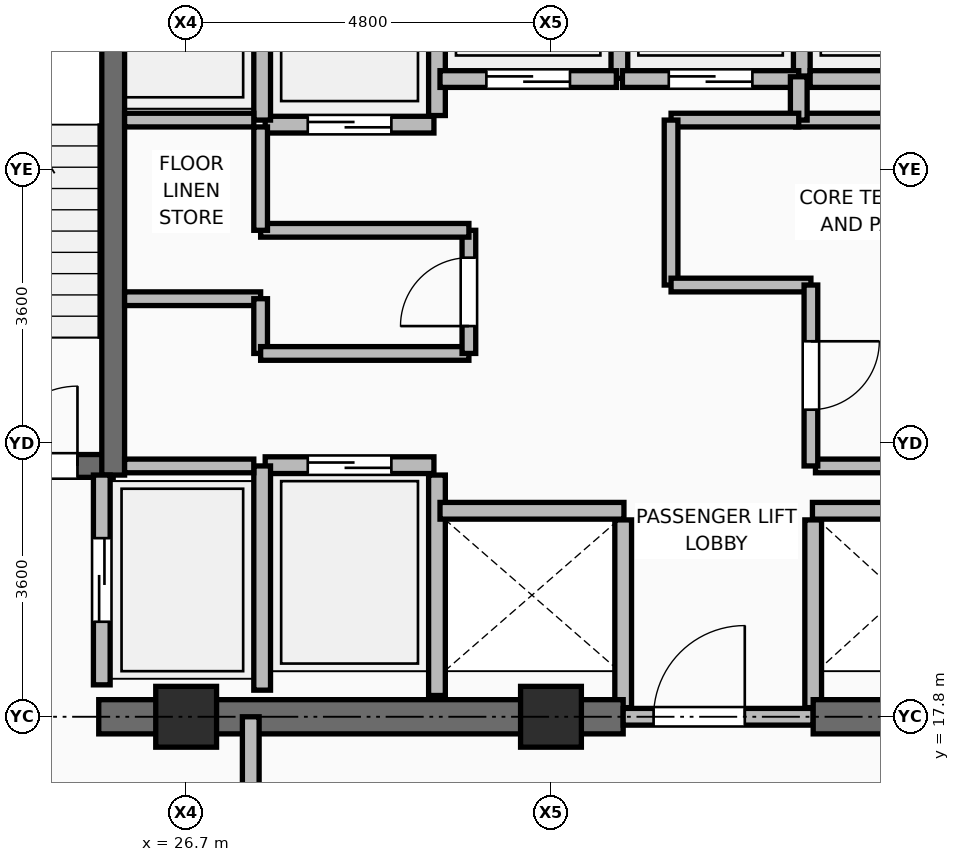
"""IFC4 building model, lengths in metres.
Left out: names, types, materials, properties, quantities, classifications, styles, units other than length and angle.
Written with IfcOpenShell. Run it as: python <this file> out.ifc"""

import sys

from ifc_helpers import new_model, si_unit, direction, frame, frame_2d, origin, origin_2d, place, context, subcontext, project, spatial, rectangle, extrude, element, fill, save


model = new_model("IFC4")
c1 = context("Model", 3, precision=1e-05, world=origin(), true_north=direction((0.0, 1.0)))
c2 = subcontext(c1, "Body", "Model", "MODEL_VIEW")
j1 = project(units=[si_unit("LENGTHUNIT", "METRE"), si_unit("PLANEANGLEUNIT", "RADIAN")], contexts=[c1])
p1 = place(None, origin())
s1 = spatial("IfcSite", under=j1, at=p1, CompositionType="ELEMENT")
p2 = place(p1, origin())
s2 = spatial("IfcBuilding", under=s1, at=p2, CompositionType="ELEMENT")
p3 = place(p2, frame((0.0, 0.0, 242.4)))
s3 = spatial("IfcBuildingStorey", under=s2, at=p3, CompositionType="ELEMENT", Elevation=242.4)
for number, where, z_axis, x_axis in (
    (1, (26.7, 17.8, 0.0), (0.0, 0.0, 1.0), (1.0, 0.0, 0.0)),
    (2, (31.5, 17.8, 0.0), (0.0, 0.0, 1.0), (1.0, 0.0, 0.0)),
):
    element("IfcColumn", number, at=place(p3, frame(where, z_axis=z_axis, x_axis=x_axis)), inside=s3, PredefinedType="COLUMN", context=c2, shape_type="SweptSolid", body=[
        extrude(rectangle(XDim=0.8, YDim=0.8, at=origin_2d()), origin(), (0.0, 0.0, 1.0), 3.75),
    ])
p4 = place(p3, frame((30.0, 18.08, 0.0), z_axis=(0.0, 0.0, 1.0), x_axis=(0.0, 1.0, 0.0)))
e3 = element("IfcWall", 3, at=p4, inside=s3, PredefinedType="PARTITIONING", context=c2, shape_type="SweptSolid", body=[
    extrude(rectangle(XDim=2.9, YDim=0.22, at=frame_2d((1.45, 0.0))), origin(), (0.0, 0.0, 1.0), 3.545),
])
for number, where, z_axis, x_axis in (
    (4, (32.45, 17.92, 0.0), (0.0, 0.0, 1.0), (0.0, 1.0, 0.0)),
    (5, (34.95, 17.92, 0.0), (0.0, 0.0, 1.0), (0.0, 1.0, 0.0)),
):
    element("IfcWall", number, at=place(p3, frame(where, z_axis=z_axis, x_axis=x_axis)), inside=s3, PredefinedType="PARTITIONING", context=c2, shape_type="SweptSolid", body=[
        extrude(rectangle(XDim=2.47, YDim=0.22, at=frame_2d((1.235, 0.0))), origin(), (0.0, 0.0, 1.0), 3.545),
    ])
p5 = place(p3, frame((30.0, 25.71, 0.0), z_axis=(0.0, 0.0, 1.0), x_axis=(0.0, 1.0, 0.0)))
e6 = element("IfcWall", 6, at=p5, inside=s3, PredefinedType="PARTITIONING", context=c2, shape_type="SweptSolid", body=[
    extrude(rectangle(XDim=2.73, YDim=0.22, at=frame_2d((1.365, 0.0))), origin(), (0.0, 0.0, 1.0), 3.545),
])
p6 = place(p3, frame((32.4, 26.2, 0.0), z_axis=(0.0, 0.0, 1.0), x_axis=(0.0, 1.0, 0.0)))
e7 = element("IfcWall", 7, at=p6, inside=s3, PredefinedType="PARTITIONING", context=c2, shape_type="SweptSolid", body=[
    extrude(rectangle(XDim=2.24, YDim=0.22, at=frame_2d((1.12, 0.0))), origin(), (0.0, 0.0, 1.0), 3.545),
])
p7 = place(p3, frame((34.8, 26.23, 0.0), z_axis=(0.0, 0.0, 1.0), x_axis=(0.0, 1.0, 0.0)))
e8 = element("IfcWall", 8, at=p7, inside=s3, PredefinedType="PARTITIONING", context=c2, shape_type="SweptSolid", body=[
    extrude(rectangle(XDim=2.21, YDim=0.22, at=frame_2d((1.105, 0.0))), origin(), (0.0, 0.0, 1.0), 3.545),
])
p8 = place(p3, frame((34.91, 26.19, 0.0), z_axis=(0.0, 0.0, 1.0), x_axis=(1.0, 0.0, 0.0)))
e9 = element("IfcWall", 9, at=p8, inside=s3, PredefinedType="PARTITIONING", context=c2, shape_type="SweptSolid", body=[
    extrude(rectangle(XDim=2.14, YDim=0.22, at=frame_2d((1.07, 0.0))), origin(), (0.0, 0.0, 1.0), 3.545),
])
p9 = place(p3, frame((25.55, 17.8, 0.0), z_axis=(0.0, 0.0, 1.0), x_axis=(1.0, 0.0, 0.0)))
e10 = element("IfcWall", 10, at=p9, inside=s3, PredefinedType="SHEAR", context=c2, shape_type="SweptSolid", body=[
    extrude(rectangle(XDim=6.9, YDim=0.45, at=frame_2d((3.45, 0.0))), origin(), (0.0, 0.0, 1.0), 3.57),
])
p10 = place(p3, frame((32.45, 17.8, 0.0), z_axis=(0.0, 0.0, 1.0), x_axis=(1.0, 0.0, 0.0)))
e11 = element("IfcWall", 11, at=p10, inside=s3, PredefinedType="PARTITIONING", context=c2, shape_type="SweptSolid", body=[
    extrude(rectangle(XDim=2.5, YDim=0.22, at=frame_2d((1.25, 0.0))), origin(), (0.0, 0.0, 1.0), 3.081),
])
p11 = place(p10, frame((0.4, 0.0, 0.0)))
e12 = element("IfcOpeningElement", 12, at=p11, cuts=e11, PredefinedType="OPENING", context=c2, shape_type="SweptSolid", body=[
    extrude(rectangle(XDim=1.2, YDim=2.1, at=frame_2d((0.6, 1.05))), frame((0.0, 0.12, 0.0), z_axis=(0.0, -1.0, 0.0), x_axis=(1.0, 0.0, 0.0)), (0.0, 0.0, 1.0), 0.24),
])
p12 = place(p3, frame((34.95, 17.8, 0.0), z_axis=(0.0, 0.0, 1.0), x_axis=(1.0, 0.0, 0.0)))
e13 = element("IfcWall", 13, at=p12, inside=s3, PredefinedType="SHEAR", context=c2, shape_type="SweptSolid", body=[
    extrude(rectangle(XDim=6.375, YDim=0.45, at=frame_2d((3.188, 0.0))), origin(), (0.0, 0.0, 1.0), 3.57),
])
p13 = place(p3, frame((22.125, 21.1, 0.0), z_axis=(0.0, 0.0, 1.0), x_axis=(1.0, 0.0, 0.0)))
e14 = element("IfcWall", 14, at=p13, inside=s3, PredefinedType="SHEAR", context=c2, shape_type="SweptSolid", body=[
    extrude(rectangle(XDim=3.615, YDim=0.3, at=frame_2d((1.808, 0.0))), origin(), (0.0, 0.0, 1.0), 3.57),
])
p14 = place(p13, frame((2.095, 0.0, 0.0)))
e15 = element("IfcOpeningElement", 15, at=p14, cuts=e14, PredefinedType="OPENING", context=c2, shape_type="SweptSolid", body=[
    extrude(rectangle(XDim=1.05, YDim=2.1, at=frame_2d((0.525, 1.05))), frame((0.0, 0.16, 0.0), z_axis=(0.0, -1.0, 0.0), x_axis=(1.0, 0.0, 0.0)), (0.0, 0.0, 1.0), 0.32),
])
p15 = place(p3, frame((25.74, 20.98, 0.0), z_axis=(0.0, 0.0, 1.0), x_axis=(0.0, 1.0, 0.0)))
e16 = element("IfcWall", 16, at=p15, inside=s3, PredefinedType="SHEAR", context=c2, shape_type="SweptSolid", body=[
    extrude(rectangle(XDim=7.99, YDim=0.3, at=frame_2d((3.995, 0.0))), origin(), (0.0, 0.0, 1.0), 3.57),
])
p16 = place(p3, frame((25.59, 18.22, 0.0), z_axis=(0.0, 0.0, 1.0), x_axis=(0.0, 1.0, 0.0)))
e17 = element("IfcWall", 17, at=p16, inside=s3, PredefinedType="PARTITIONING", context=c2, shape_type="SweptSolid", body=[
    extrude(rectangle(XDim=2.76, YDim=0.22, at=frame_2d((1.38, 0.0))), origin(), (0.0, 0.0, 1.0), 3.55),
])
p17 = place(p16, frame((0.83, 0.0, 0.0)))
e18 = element("IfcOpeningElement", 18, at=p17, cuts=e17, PredefinedType="OPENING", context=c2, shape_type="SweptSolid", body=[
    extrude(rectangle(XDim=1.1, YDim=2.2, at=frame_2d((0.55, 1.1))), frame((0.0, 0.12, 0.0), z_axis=(0.0, -1.0, 0.0), x_axis=(1.0, 0.0, 0.0)), (0.0, 0.0, 1.0), 0.24),
])
p18 = place(p3, frame((27.74, 21.11, 0.0), z_axis=(0.0, 0.0, 1.0), x_axis=(1.0, 0.0, 0.0)))
e19 = element("IfcWall", 19, at=p18, inside=s3, PredefinedType="PARTITIONING", context=c2, shape_type="SweptSolid", body=[
    extrude(rectangle(XDim=2.22, YDim=0.22, at=frame_2d((1.11, 0.0))), origin(), (0.0, 0.0, 1.0), 3.55),
])
p19 = place(p18, frame((0.56, 0.0, 0.0)))
e20 = element("IfcOpeningElement", 20, at=p19, cuts=e19, PredefinedType="OPENING", context=c2, shape_type="SweptSolid", body=[
    extrude(rectangle(XDim=1.1, YDim=2.2, at=frame_2d((0.55, 1.1))), frame((0.0, 0.12, 0.0), z_axis=(0.0, -1.0, 0.0), x_axis=(1.0, 0.0, 0.0)), (0.0, 0.0, 1.0), 0.24),
])
p20 = place(p3, frame((27.74, 25.59, 0.0), z_axis=(0.0, 0.0, 1.0), x_axis=(1.0, 0.0, 0.0)))
e21 = element("IfcWall", 21, at=p20, inside=s3, PredefinedType="PARTITIONING", context=c2, shape_type="SweptSolid", body=[
    extrude(rectangle(XDim=2.22, YDim=0.22, at=frame_2d((1.11, 0.0))), origin(), (0.0, 0.0, 1.0), 3.55),
])
p21 = place(p20, frame((0.56, 0.0, 0.0)))
e22 = element("IfcOpeningElement", 22, at=p21, cuts=e21, PredefinedType="OPENING", context=c2, shape_type="SweptSolid", body=[
    extrude(rectangle(XDim=1.1, YDim=2.2, at=frame_2d((0.55, 1.1))), frame((0.0, 0.12, 0.0), z_axis=(0.0, -1.0, 0.0), x_axis=(1.0, 0.0, 0.0)), (0.0, 0.0, 1.0), 0.24),
])
p22 = place(p3, frame((30.04, 20.51, 0.0), z_axis=(0.0, 0.0, 1.0), x_axis=(1.0, 0.0, 0.0)))
e23 = element("IfcWall", 23, at=p22, inside=s3, PredefinedType="PARTITIONING", context=c2, shape_type="SweptSolid", body=[
    extrude(rectangle(XDim=2.42, YDim=0.22, at=frame_2d((1.21, 0.0))), origin(), (0.0, 0.0, 1.0), 3.55),
])
p23 = place(p3, frame((34.94, 20.51, 0.0), z_axis=(0.0, 0.0, 1.0), x_axis=(1.0, 0.0, 0.0)))
e24 = element("IfcWall", 24, at=p23, inside=s3, PredefinedType="PARTITIONING", context=c2, shape_type="SweptSolid", body=[
    extrude(rectangle(XDim=2.24, YDim=0.22, at=frame_2d((1.12, 0.0))), origin(), (0.0, 0.0, 1.0), 3.55),
])
p24 = place(p3, frame((30.04, 26.19, 0.0), z_axis=(0.0, 0.0, 1.0), x_axis=(1.0, 0.0, 0.0)))
e25 = element("IfcWall", 25, at=p24, inside=s3, PredefinedType="PARTITIONING", context=c2, shape_type="SweptSolid", body=[
    extrude(rectangle(XDim=2.32, YDim=0.22, at=frame_2d((1.16, 0.0))), origin(), (0.0, 0.0, 1.0), 3.55),
])
p25 = place(p24, frame((0.61, 0.0, 0.0)))
e26 = element("IfcOpeningElement", 26, at=p25, cuts=e25, PredefinedType="OPENING", context=c2, shape_type="SweptSolid", body=[
    extrude(rectangle(XDim=1.1, YDim=2.2, at=frame_2d((0.55, 1.1))), frame((0.0, 0.12, 0.0), z_axis=(0.0, -1.0, 0.0), x_axis=(1.0, 0.0, 0.0)), (0.0, 0.0, 1.0), 0.24),
])
p26 = place(p3, frame((32.44, 26.19, 0.0), z_axis=(0.0, 0.0, 1.0), x_axis=(1.0, 0.0, 0.0)))
e27 = element("IfcWall", 27, at=p26, inside=s3, PredefinedType="PARTITIONING", context=c2, shape_type="SweptSolid", body=[
    extrude(rectangle(XDim=2.32, YDim=0.22, at=frame_2d((1.16, 0.0))), origin(), (0.0, 0.0, 1.0), 3.55),
])
p27 = place(p26, frame((0.61, 0.0, 0.0)))
e28 = element("IfcOpeningElement", 28, at=p27, cuts=e27, PredefinedType="OPENING", context=c2, shape_type="SweptSolid", body=[
    extrude(rectangle(XDim=1.1, YDim=2.2, at=frame_2d((0.55, 1.1))), frame((0.0, 0.12, 0.0), z_axis=(0.0, -1.0, 0.0), x_axis=(1.0, 0.0, 0.0)), (0.0, 0.0, 1.0), 0.24),
])
p28 = place(p3, frame((27.7, 18.15, 0.0), z_axis=(0.0, 0.0, 1.0), x_axis=(0.0, 1.0, 0.0)))
e29 = element("IfcWall", 29, at=p28, inside=s3, PredefinedType="PARTITIONING", context=c2, shape_type="SweptSolid", body=[
    extrude(rectangle(XDim=2.95, YDim=0.22, at=frame_2d((1.475, 0.0))), origin(), (0.0, 0.0, 1.0), 3.55),
])
p29 = place(p3, frame((27.7, 25.65, 0.0), z_axis=(0.0, 0.0, 1.0), x_axis=(0.0, 1.0, 0.0)))
e30 = element("IfcWall", 30, at=p29, inside=s3, PredefinedType="PARTITIONING", context=c2, shape_type="SweptSolid", body=[
    extrude(rectangle(XDim=3.0, YDim=0.22, at=frame_2d((1.5, 0.0))), origin(), (0.0, 0.0, 1.0), 3.55),
])
for number, where, z_axis, x_axis in (
    (31, (25.89, 21.1, 0.0), (0.0, 0.0, 1.0), (1.0, 0.0, 0.0)),
    (32, (25.89, 25.65, 0.0), (0.0, 0.0, 1.0), (1.0, 0.0, 0.0)),
):
    element("IfcWall", number, at=place(p3, frame(where, z_axis=z_axis, x_axis=x_axis)), inside=s3, PredefinedType="PARTITIONING", context=c2, shape_type="SweptSolid", body=[
        extrude(rectangle(XDim=1.7, YDim=0.18, at=frame_2d((0.85, 0.0))), origin(), (0.0, 0.0, 1.0), 3.55),
    ])
p30 = place(p3, frame((25.89, 23.3, 0.0), z_axis=(0.0, 0.0, 1.0), x_axis=(1.0, 0.0, 0.0)))
e33 = element("IfcWall", 33, at=p30, inside=s3, PredefinedType="PARTITIONING", context=c2, shape_type="SweptSolid", body=[
    extrude(rectangle(XDim=1.79, YDim=0.18, at=frame_2d((0.895, 0.0))), origin(), (0.0, 0.0, 1.0), 3.55),
])
p31 = place(p3, frame((27.68, 22.58, 0.0), z_axis=(0.0, 0.0, 1.0), x_axis=(0.0, 1.0, 0.0)))
e34 = element("IfcWall", 34, at=p31, inside=s3, PredefinedType="PARTITIONING", context=c2, shape_type="SweptSolid", body=[
    extrude(rectangle(XDim=0.72, YDim=0.18, at=frame_2d((0.36, 0.0))), origin(), (0.0, 0.0, 1.0), 3.55),
])
p32 = place(p3, frame((27.68, 22.58, 0.0), z_axis=(0.0, 0.0, 1.0), x_axis=(1.0, 0.0, 0.0)))
e35 = element("IfcWall", 35, at=p32, inside=s3, PredefinedType="PARTITIONING", context=c2, shape_type="SweptSolid", body=[
    extrude(rectangle(XDim=2.74, YDim=0.18, at=frame_2d((1.37, 0.0))), origin(), (0.0, 0.0, 1.0), 3.55),
])
p33 = place(p3, frame((30.42, 22.58, 0.0), z_axis=(0.0, 0.0, 1.0), x_axis=(0.0, 1.0, 0.0)))
e36 = element("IfcWall", 36, at=p33, inside=s3, PredefinedType="PARTITIONING", context=c2, shape_type="SweptSolid", body=[
    extrude(rectangle(XDim=1.62, YDim=0.18, at=frame_2d((0.81, 0.0))), origin(), (0.0, 0.0, 1.0), 3.55),
])
p34 = place(p33, frame((0.36, 0.0, 0.0)))
e37 = element("IfcOpeningElement", 37, at=p34, cuts=e36, PredefinedType="OPENING", context=c2, shape_type="SweptSolid", body=[
    extrude(rectangle(XDim=0.9, YDim=2.1, at=frame_2d((0.45, 1.05))), frame((0.0, 0.1, 0.0), z_axis=(0.0, -1.0, 0.0), x_axis=(1.0, 0.0, 0.0)), (0.0, 0.0, 1.0), 0.2),
])
p35 = place(p3, frame((27.68, 24.2, 0.0), z_axis=(0.0, 0.0, 1.0), x_axis=(1.0, 0.0, 0.0)))
e38 = element("IfcWall", 38, at=p35, inside=s3, PredefinedType="PARTITIONING", context=c2, shape_type="SweptSolid", body=[
    extrude(rectangle(XDim=2.74, YDim=0.18, at=frame_2d((1.37, 0.0))), origin(), (0.0, 0.0, 1.0), 3.55),
])
p36 = place(p3, frame((27.68, 24.2, 0.0), z_axis=(0.0, 0.0, 1.0), x_axis=(0.0, 1.0, 0.0)))
e39 = element("IfcWall", 39, at=p36, inside=s3, PredefinedType="PARTITIONING", context=c2, shape_type="SweptSolid", body=[
    extrude(rectangle(XDim=1.36, YDim=0.18, at=frame_2d((0.68, 0.0))), origin(), (0.0, 0.0, 1.0), 3.55),
])
p37 = place(p3, frame((34.98, 21.1, 0.0), z_axis=(0.0, 0.0, 1.0), x_axis=(1.0, 0.0, 0.0)))
e40 = element("IfcWall", 40, at=p37, inside=s3, PredefinedType="PARTITIONING", context=c2, shape_type="SweptSolid", body=[
    extrude(rectangle(XDim=2.08, YDim=0.18, at=frame_2d((1.04, 0.0))), origin(), (0.0, 0.0, 1.0), 3.55),
])
p38 = place(p3, frame((34.72, 25.65, 0.0), z_axis=(0.0, 0.0, 1.0), x_axis=(1.0, 0.0, 0.0)))
e41 = element("IfcWall", 41, at=p38, inside=s3, PredefinedType="PARTITIONING", context=c2, shape_type="SweptSolid", body=[
    extrude(rectangle(XDim=2.34, YDim=0.18, at=frame_2d((1.17, 0.0))), origin(), (0.0, 0.0, 1.0), 3.55),
])
p39 = place(p3, frame((34.76, 25.65, 0.0), z_axis=(0.0, 0.0, 1.0), x_axis=(0.0, 1.0, 0.0)))
e42 = element("IfcWall", 42, at=p39, inside=s3, PredefinedType="PARTITIONING", context=c2, shape_type="SweptSolid", body=[
    extrude(rectangle(XDim=0.57, YDim=0.22, at=frame_2d((0.285, 0.0))), origin(), (0.0, 0.0, 1.0), 3.55),
])
p40 = place(p3, frame((33.08, 25.65, 0.0), z_axis=(0.0, 0.0, 1.0), x_axis=(1.0, 0.0, 0.0)))
e43 = element("IfcWall", 43, at=p40, inside=s3, PredefinedType="PARTITIONING", context=c2, shape_type="SweptSolid", body=[
    extrude(rectangle(XDim=1.68, YDim=0.18, at=frame_2d((0.84, 0.0))), origin(), (0.0, 0.0, 1.0), 3.55),
])
p41 = place(p3, frame((33.08, 23.48, 0.0), z_axis=(0.0, 0.0, 1.0), x_axis=(0.0, 1.0, 0.0)))
e44 = element("IfcWall", 44, at=p41, inside=s3, PredefinedType="PARTITIONING", context=c2, shape_type="SweptSolid", body=[
    extrude(rectangle(XDim=2.17, YDim=0.18, at=frame_2d((1.085, 0.0))), origin(), (0.0, 0.0, 1.0), 3.55),
])
p42 = place(p3, frame((33.08, 23.48, 0.0), z_axis=(0.0, 0.0, 1.0), x_axis=(1.0, 0.0, 0.0)))
e45 = element("IfcWall", 45, at=p42, inside=s3, PredefinedType="PARTITIONING", context=c2, shape_type="SweptSolid", body=[
    extrude(rectangle(XDim=1.84, YDim=0.18, at=frame_2d((0.92, 0.0))), origin(), (0.0, 0.0, 1.0), 3.55),
])
p43 = place(p3, frame((34.92, 21.1, 0.0), z_axis=(0.0, 0.0, 1.0), x_axis=(0.0, 1.0, 0.0)))
e46 = element("IfcWall", 46, at=p43, inside=s3, PredefinedType="PARTITIONING", context=c2, shape_type="SweptSolid", body=[
    extrude(rectangle(XDim=2.38, YDim=0.18, at=frame_2d((1.19, 0.0))), origin(), (0.0, 0.0, 1.0), 3.55),
])
p44 = place(p43, frame((0.74, 0.0, 0.0)))
e47 = element("IfcOpeningElement", 47, at=p44, cuts=e46, PredefinedType="OPENING", context=c2, shape_type="SweptSolid", body=[
    extrude(rectangle(XDim=0.9, YDim=2.1, at=frame_2d((0.45, 1.05))), frame((0.0, 0.1, 0.0), z_axis=(0.0, -1.0, 0.0), x_axis=(1.0, 0.0, 0.0)), (0.0, 0.0, 1.0), 0.2),
])
p45 = place(p3, frame((27.55, 14.35, 0.0), z_axis=(0.0, 0.0, 1.0), x_axis=(0.0, 1.0, 0.0)))
e48 = element("IfcWall", 48, at=p45, inside=s3, PredefinedType="PARTITIONING", context=c2, shape_type="SweptSolid", body=[
    extrude(rectangle(XDim=3.45, YDim=0.22, at=frame_2d((1.725, 0.0))), origin(), (0.0, 0.0, 1.0), 3.081),
])
p46 = place(p45, frame((1.175, 0.0, 0.0)))
e49 = element("IfcOpeningElement", 49, at=p46, cuts=e48, PredefinedType="OPENING", context=c2, shape_type="SweptSolid", body=[
    extrude(rectangle(XDim=1.1, YDim=2.1, at=frame_2d((0.55, 1.05))), frame((0.0, 0.12, 0.0), z_axis=(0.0, -1.0, 0.0), x_axis=(1.0, 0.0, 0.0)), (0.0, 0.0, 1.0), 0.24),
])
p47 = place(p11, origin())
e50 = element("IfcDoor", 50, at=p47, inside=s3, OperationType="SINGLE_SWING_RIGHT", PredefinedType="DOOR", context=c2, shape_type="SweptSolid", body=[
    extrude(rectangle(XDim=1.2, YDim=2.1, at=frame_2d((0.6, 1.05))), frame((0.0, 0.025, 0.0), z_axis=(0.0, -1.0, 0.0), x_axis=(1.0, 0.0, 0.0)), (0.0, 0.0, 1.0), 0.05),
])
fill(e12, e50)
p48 = place(p14, origin())
e51 = element("IfcDoor", 51, at=p48, inside=s3, OperationType="SINGLE_SWING_RIGHT", PredefinedType="DOOR", context=c2, shape_type="SweptSolid", body=[
    extrude(rectangle(XDim=1.05, YDim=2.1, at=frame_2d((0.525, 1.05))), frame((0.0, 0.025, 0.0), z_axis=(0.0, -1.0, 0.0), x_axis=(1.0, 0.0, 0.0)), (0.0, 0.0, 1.0), 0.05),
])
fill(e15, e51)
p49 = place(p17, origin())
e52 = element("IfcDoor", 52, at=p49, inside=s3, OperationType="DOUBLE_DOOR_SLIDING", PredefinedType="DOOR", context=c2, shape_type="SweptSolid", body=[
    extrude(rectangle(XDim=1.1, YDim=2.2, at=frame_2d((0.55, 1.1))), frame((0.0, 0.025, 0.0), z_axis=(0.0, -1.0, 0.0), x_axis=(1.0, 0.0, 0.0)), (0.0, 0.0, 1.0), 0.05),
])
fill(e18, e52)
p50 = place(p19, origin())
e53 = element("IfcDoor", 53, at=p50, inside=s3, OperationType="DOUBLE_DOOR_SLIDING", PredefinedType="DOOR", context=c2, shape_type="SweptSolid", body=[
    extrude(rectangle(XDim=1.1, YDim=2.2, at=frame_2d((0.55, 1.1))), frame((0.0, 0.025, 0.0), z_axis=(0.0, -1.0, 0.0), x_axis=(1.0, 0.0, 0.0)), (0.0, 0.0, 1.0), 0.05),
])
fill(e20, e53)
p51 = place(p21, frame((1.1, 0.0, 0.0), z_axis=(0.0, 0.0, 1.0), x_axis=(-1.0, 0.0, 0.0)))
e54 = element("IfcDoor", 54, at=p51, inside=s3, OperationType="DOUBLE_DOOR_SLIDING", PredefinedType="DOOR", context=c2, shape_type="SweptSolid", body=[
    extrude(rectangle(XDim=1.1, YDim=2.2, at=frame_2d((0.55, 1.1))), frame((0.0, 0.025, 0.0), z_axis=(0.0, -1.0, 0.0), x_axis=(1.0, 0.0, 0.0)), (0.0, 0.0, 1.0), 0.05),
])
fill(e22, e54)
p52 = place(p25, frame((1.1, 0.0, 0.0), z_axis=(0.0, 0.0, 1.0), x_axis=(-1.0, 0.0, 0.0)))
e55 = element("IfcDoor", 55, at=p52, inside=s3, OperationType="DOUBLE_DOOR_SLIDING", PredefinedType="DOOR", context=c2, shape_type="SweptSolid", body=[
    extrude(rectangle(XDim=1.1, YDim=2.2, at=frame_2d((0.55, 1.1))), frame((0.0, 0.025, 0.0), z_axis=(0.0, -1.0, 0.0), x_axis=(1.0, 0.0, 0.0)), (0.0, 0.0, 1.0), 0.05),
])
fill(e26, e55)
p53 = place(p27, frame((1.1, 0.0, 0.0), z_axis=(0.0, 0.0, 1.0), x_axis=(-1.0, 0.0, 0.0)))
e56 = element("IfcDoor", 56, at=p53, inside=s3, OperationType="DOUBLE_DOOR_SLIDING", PredefinedType="DOOR", context=c2, shape_type="SweptSolid", body=[
    extrude(rectangle(XDim=1.1, YDim=2.2, at=frame_2d((0.55, 1.1))), frame((0.0, 0.025, 0.0), z_axis=(0.0, -1.0, 0.0), x_axis=(1.0, 0.0, 0.0)), (0.0, 0.0, 1.0), 0.05),
])
fill(e28, e56)
p54 = place(p34, origin())
e57 = element("IfcDoor", 57, at=p54, inside=s3, OperationType="SINGLE_SWING_LEFT", PredefinedType="DOOR", context=c2, shape_type="SweptSolid", body=[
    extrude(rectangle(XDim=0.9, YDim=2.1, at=frame_2d((0.45, 1.05))), frame((0.0, 0.025, 0.0), z_axis=(0.0, -1.0, 0.0), x_axis=(1.0, 0.0, 0.0)), (0.0, 0.0, 1.0), 0.05),
])
fill(e37, e57)
p55 = place(p44, frame((0.9, 0.0, 0.0), z_axis=(0.0, 0.0, 1.0), x_axis=(-1.0, 0.0, 0.0)))
e58 = element("IfcDoor", 58, at=p55, inside=s3, OperationType="SINGLE_SWING_LEFT", PredefinedType="DOOR", context=c2, shape_type="SweptSolid", body=[
    extrude(rectangle(XDim=0.9, YDim=2.1, at=frame_2d((0.45, 1.05))), frame((0.0, 0.025, 0.0), z_axis=(0.0, -1.0, 0.0), x_axis=(1.0, 0.0, 0.0)), (0.0, 0.0, 1.0), 0.05),
])
fill(e47, e58)
save(model, sys.argv[1])
